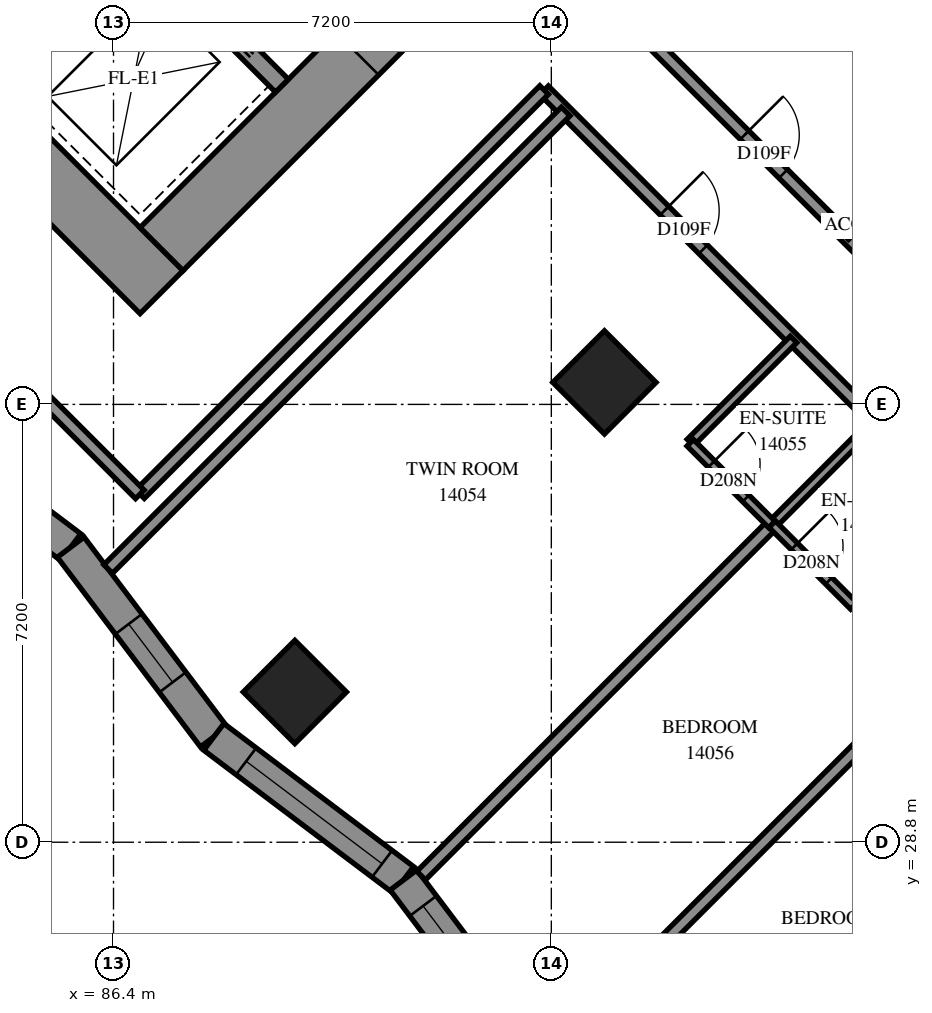
"""IFC4 building model, lengths in metres.
Left out: names, types, materials, properties, quantities, classifications, styles, units other than length and angle.
Written with IfcOpenShell. Run it as: python <this file> out.ifc"""

import sys

from ifc_helpers import new_model, si_unit, direction, frame, frame_2d, origin, origin_2d, place, context, subcontext, project, spatial, polyline, rectangle, outline, extrude, element, fill, save


model = new_model("IFC4")
c1 = context("Model", 3, precision=1e-05, world=origin(), true_north=direction((0.0, 1.0)))
c2 = subcontext(c1, "Body", "Model", "MODEL_VIEW")
j1 = project(units=[si_unit("LENGTHUNIT", "METRE"), si_unit("PLANEANGLEUNIT", "RADIAN")], contexts=[c1])
p1 = place(None, origin())
s1 = spatial("IfcSite", under=j1, at=p1, CompositionType="ELEMENT")
p2 = place(p1, origin())
s2 = spatial("IfcBuilding", under=s1, at=p2, CompositionType="ELEMENT")
p3 = place(p2, frame((0.0, 0.0, 54.2)))
s3 = spatial("IfcBuildingStorey", under=s2, at=p3, CompositionType="ELEMENT", Elevation=54.2)
for number, where, z_axis, x_axis in (
    (1, (94.474, 36.362, 0.0), (0.0, 0.0, 1.0), (0.707, -0.707, 0.0)),
    (2, (89.382, 31.271, 0.0), (0.0, 0.0, 1.0), (0.707, -0.707, 0.0)),
):
    element("IfcColumn", number, at=place(p3, frame(where, z_axis=z_axis, x_axis=x_axis)), inside=s3, PredefinedType="COLUMN", context=c2, shape_type="SweptSolid", body=[
        extrude(rectangle(XDim=1.2, YDim=1.2, at=origin_2d()), origin(), (0.0, 0.0, 1.0), 3.1),
    ])
p4 = place(p3, frame((75.594, 49.443, -0.3), z_axis=(0.0, 0.0, 1.0), x_axis=(0.7071037324, -0.70710983, 0.0)))
e3 = element("IfcWall", 3, at=p4, inside=s3, PredefinedType="SHEAR", context=c2, shape_type="SweptSolid", body=[
    extrude(rectangle(XDim=16.4, YDim=1.0, at=frame_2d((8.2, 0.0))), origin(), (0.0, 0.0, 1.0), 2.7),
])
p5 = place(p3, frame((87.19, 38.554, -0.3), z_axis=(0.0, 0.0, 1.0), x_axis=(0.707103309, 0.7071102534, 0.0)))
e4 = element("IfcWall", 4, at=p5, inside=s3, PredefinedType="SHEAR", context=c2, shape_type="SweptSolid", body=[
    extrude(rectangle(XDim=14.4, YDim=1.0, at=frame_2d((7.2, 0.0))), origin(), (0.0, 0.0, 1.0), 2.7),
])
p6 = place(p5, frame((4.55, 0.0, 0.3)))
e5 = element("IfcOpeningElement", 5, at=p6, cuts=e4, PredefinedType="OPENING", context=c2, shape_type="SweptSolid", body=[
    extrude(rectangle(XDim=1.1, YDim=2.1, at=frame_2d((0.55, 1.05))), frame((0.0, 0.51, 0.0), z_axis=(0.0, -1.0, 0.0), x_axis=(1.0, 0.0, 0.0)), (0.0, 0.0, 1.0), 1.02),
])
p7 = place(p5, frame((11.35, 0.0, 0.3)))
e6 = element("IfcOpeningElement", 6, at=p7, cuts=e4, PredefinedType="OPENING", context=c2, shape_type="SweptSolid", body=[
    extrude(rectangle(XDim=1.1, YDim=2.1, at=frame_2d((0.55, 1.05))), frame((0.0, 0.51, 0.0), z_axis=(0.0, -1.0, 0.0), x_axis=(1.0, 0.0, 0.0)), (0.0, 0.0, 1.0), 1.02),
])
p8 = place(p3, frame((84.291, 41.453, 0.0), z_axis=(0.0, 0.0, 1.0), x_axis=(0.7071067812, 0.7071067812, 0.0)))
e7 = element("IfcWall", 7, at=p8, inside=s3, PredefinedType="SOLIDWALL", context=c2, shape_type="SweptSolid", body=[
    extrude(rectangle(XDim=3.3, YDim=0.3, at=frame_2d((1.65, 0.0))), origin(), (0.0, 0.0, 1.0), 3.1),
])
p9 = place(p3, frame((78.988, 51.423, 0.0), z_axis=(0.0, 0.0, 1.0), x_axis=(0.7071067812, -0.7071067812, 0.0)))
e8 = element("IfcWall", 8, at=p9, inside=s3, PredefinedType="SOLIDWALL", context=c2, shape_type="SweptSolid", body=[
    extrude(rectangle(XDim=14.4, YDim=0.3, at=frame_2d((7.2, 0.0))), origin(), (0.0, 0.0, 1.0), 3.1),
])
p10 = place(p9, frame((1.25, 0.0, 0.0)))
e9 = element("IfcOpeningElement", 9, at=p10, cuts=e8, PredefinedType="OPENING", context=c2, shape_type="SweptSolid", body=[
    extrude(rectangle(XDim=1.1, YDim=2.1, at=frame_2d((0.55, 1.05))), frame((0.0, 0.16, 0.0), z_axis=(0.0, -1.0, 0.0), x_axis=(1.0, 0.0, 0.0)), (0.0, 0.0, 1.0), 0.32),
])
p11 = place(p9, frame((4.85, 0.0, 0.0)))
e10 = element("IfcOpeningElement", 10, at=p11, cuts=e8, PredefinedType="OPENING", context=c2, shape_type="SweptSolid", body=[
    extrude(rectangle(XDim=1.1, YDim=2.1, at=frame_2d((0.55, 1.05))), frame((0.0, 0.16, 0.0), z_axis=(0.0, -1.0, 0.0), x_axis=(1.0, 0.0, 0.0)), (0.0, 0.0, 1.0), 0.32),
])
p12 = place(p9, frame((8.45, 0.0, 0.0)))
e11 = element("IfcOpeningElement", 11, at=p12, cuts=e8, PredefinedType="OPENING", context=c2, shape_type="SweptSolid", body=[
    extrude(rectangle(XDim=1.1, YDim=2.1, at=frame_2d((0.55, 1.05))), frame((0.0, 0.16, 0.0), z_axis=(0.0, -1.0, 0.0), x_axis=(1.0, 0.0, 0.0)), (0.0, 0.0, 1.0), 0.32),
])
p13 = place(p9, frame((12.05, 0.0, 0.0)))
e12 = element("IfcOpeningElement", 12, at=p13, cuts=e8, PredefinedType="OPENING", context=c2, shape_type="SweptSolid", body=[
    extrude(rectangle(XDim=1.1, YDim=2.1, at=frame_2d((0.55, 1.05))), frame((0.0, 0.16, 0.0), z_axis=(0.0, -1.0, 0.0), x_axis=(1.0, 0.0, 0.0)), (0.0, 0.0, 1.0), 0.32),
])
p14 = place(p3, frame((82.577, 36.005, 0.0), z_axis=(0.0, 0.0, 1.0), x_axis=(0.7983449017, -0.6022004799, 0.0)))
e13 = element("IfcWall", 13, at=p14, inside=s3, PredefinedType="SOLIDWALL", context=c2, shape_type="SweptSolid", body=[
    extrude(outline(polyline([(-0.038, -0.275), (3.869, -0.275), (3.946, 0.275), (0.038, 0.275), (-0.038, -0.275)])), origin(), (0.0, 0.0, 1.0), 3.1),
])
p15 = place(p14, frame((1.739, 0.0, 0.5)))
e14 = element("IfcOpeningElement", 14, at=p15, cuts=e13, PredefinedType="OPENING", context=c2, shape_type="SweptSolid", body=[
    extrude(rectangle(XDim=1.2, YDim=2.45, at=frame_2d((0.6, 1.225))), frame((0.0, 0.285, 0.0), z_axis=(0.0, -1.0, 0.0), x_axis=(1.0, 0.0, 0.0)), (0.0, 0.0, 1.0), 0.57),
])
p16 = place(p3, frame((85.696, 33.652, 0.0), z_axis=(0.0, 0.0, 1.0), x_axis=(0.6021964726, -0.7983479244, 0.0)))
e15 = element("IfcWall", 15, at=p16, inside=s3, PredefinedType="SOLIDWALL", context=c2, shape_type="SweptSolid", body=[
    extrude(outline(polyline([(0.038, -0.275), (3.946, -0.275), (3.869, 0.275), (-0.038, 0.275), (0.038, -0.275)])), origin(), (0.0, 0.0, 1.0), 3.1),
])
p17 = place(p16, frame((1.583, 0.0, 0.5)))
e16 = element("IfcOpeningElement", 16, at=p17, cuts=e15, PredefinedType="OPENING", context=c2, shape_type="SweptSolid", body=[
    extrude(rectangle(XDim=1.2, YDim=2.45, at=frame_2d((0.6, 1.225))), frame((0.0, 0.285, 0.0), z_axis=(0.0, -1.0, 0.0), x_axis=(1.0, 0.0, 0.0)), (0.0, 0.0, 1.0), 0.57),
])
p18 = place(p3, frame((88.05, 30.532, 0.0), z_axis=(0.0, 0.0, 1.0), x_axis=(0.7983449017, -0.6022004799, 0.0)))
e17 = element("IfcWall", 17, at=p18, inside=s3, PredefinedType="SOLIDWALL", context=c2, shape_type="SweptSolid", body=[
    extrude(outline(polyline([(-0.038, -0.275), (3.869, -0.275), (3.946, 0.275), (0.038, 0.275), (-0.038, -0.275)])), origin(), (0.0, 0.0, 1.0), 3.1),
])
p19 = place(p18, frame((0.666, 0.0, 0.5)))
e18 = element("IfcOpeningElement", 18, at=p19, cuts=e17, PredefinedType="OPENING", context=c2, shape_type="SweptSolid", body=[
    extrude(rectangle(XDim=2.8, YDim=2.45, at=frame_2d((1.4, 1.225))), frame((0.0, 0.285, 0.0), z_axis=(0.0, -1.0, 0.0), x_axis=(1.0, 0.0, 0.0)), (0.0, 0.0, 1.0), 0.57),
])
p20 = place(p3, frame((91.169, 28.179, 0.0), z_axis=(0.0, 0.0, 1.0), x_axis=(0.6022004799, -0.7983449017, 0.0)))
e19 = element("IfcWall", 19, at=p20, inside=s3, PredefinedType="SOLIDWALL", context=c2, shape_type="SweptSolid", body=[
    extrude(outline(polyline([(0.038, -0.275), (3.946, -0.275), (3.869, 0.275), (-0.038, 0.275), (0.038, -0.275)])), origin(), (0.0, 0.0, 1.0), 3.1),
])
p21 = place(p20, frame((0.535, 0.0, 0.5)))
e20 = element("IfcOpeningElement", 20, at=p21, cuts=e19, PredefinedType="OPENING", context=c2, shape_type="SweptSolid", body=[
    extrude(rectangle(XDim=2.8, YDim=2.45, at=frame_2d((1.4, 1.225))), frame((0.0, 0.285, 0.0), z_axis=(0.0, -1.0, 0.0), x_axis=(1.0, 0.0, 0.0)), (0.0, 0.0, 1.0), 0.57),
])
p22 = place(p3, frame((93.481, 41.167, 0.0), z_axis=(0.0, 0.0, 1.0), x_axis=(0.7071067812, -0.7071067812, 0.0)))
e21 = element("IfcWall", 21, at=p22, inside=s3, PredefinedType="PARTITIONING", context=c2, shape_type="SweptSolid", body=[
    extrude(rectangle(XDim=25.699, YDim=0.2, at=frame_2d((12.85, 0.0))), origin(), (0.0, 0.0, 1.0), 3.1),
])
p23 = place(p22, frame((2.8, 0.0, 0.0)))
e22 = element("IfcOpeningElement", 22, at=p23, cuts=e21, PredefinedType="OPENING", context=c2, shape_type="SweptSolid", body=[
    extrude(rectangle(XDim=0.9, YDim=2.1, at=frame_2d((0.45, 1.05))), frame((0.0, 0.11, 0.0), z_axis=(0.0, -1.0, 0.0), x_axis=(1.0, 0.0, 0.0)), (0.0, 0.0, 1.0), 0.22),
])
p24 = place(p22, frame((9.948, 0.0, 0.0)))
e23 = element("IfcOpeningElement", 23, at=p24, cuts=e21, PredefinedType="OPENING", context=c2, shape_type="SweptSolid", body=[
    extrude(rectangle(XDim=0.9, YDim=2.1, at=frame_2d((0.45, 1.05))), frame((0.0, 0.11, 0.0), z_axis=(0.0, -1.0, 0.0), x_axis=(1.0, 0.0, 0.0)), (0.0, 0.0, 1.0), 0.22),
])
p25 = place(p22, frame((11.7, 0.0, 0.0)))
e24 = element("IfcOpeningElement", 24, at=p25, cuts=e21, PredefinedType="OPENING", context=c2, shape_type="SweptSolid", body=[
    extrude(rectangle(XDim=0.9, YDim=2.1, at=frame_2d((0.45, 1.05))), frame((0.0, 0.11, 0.0), z_axis=(0.0, -1.0, 0.0), x_axis=(1.0, 0.0, 0.0)), (0.0, 0.0, 1.0), 0.22),
])
p26 = place(p22, frame((17.25, 0.0, 0.0)))
e25 = element("IfcOpeningElement", 25, at=p26, cuts=e21, PredefinedType="OPENING", context=c2, shape_type="SweptSolid", body=[
    extrude(rectangle(XDim=0.9, YDim=2.1, at=frame_2d((0.45, 1.05))), frame((0.0, 0.11, 0.0), z_axis=(0.0, -1.0, 0.0), x_axis=(1.0, 0.0, 0.0)), (0.0, 0.0, 1.0), 0.22),
])
p27 = place(p22, frame((22.82, 0.0, 0.0)))
e26 = element("IfcOpeningElement", 26, at=p27, cuts=e21, PredefinedType="OPENING", context=c2, shape_type="SweptSolid", body=[
    extrude(rectangle(XDim=0.9, YDim=2.1, at=frame_2d((0.45, 1.05))), frame((0.0, 0.11, 0.0), z_axis=(0.0, -1.0, 0.0), x_axis=(1.0, 0.0, 0.0)), (0.0, 0.0, 1.0), 0.22),
])
p28 = place(p3, frame((86.312, 33.293, 0.0), z_axis=(0.0, 0.0, 1.0), x_axis=(0.7071067812, 0.7071067812, 0.0)))
e27 = element("IfcWall", 27, at=p28, inside=s3, PredefinedType="PARTITIONING", context=c2, shape_type="SweptSolid", body=[
    extrude(rectangle(XDim=10.641, YDim=0.2, at=frame_2d((5.321, 0.0))), origin(), (0.0, 0.0, 1.0), 3.1),
])
p29 = place(p3, frame((94.761, 42.446, 0.0), z_axis=(0.0, 0.0, 1.0), x_axis=(0.7071067812, -0.7071067812, 0.0)))
e28 = element("IfcWall", 28, at=p29, inside=s3, PredefinedType="PARTITIONING", context=c2, shape_type="SweptSolid", body=[
    extrude(rectangle(XDim=9.597, YDim=0.2, at=frame_2d((4.798, 0.0))), origin(), (0.0, 0.0, 1.0), 3.1),
])
p30 = place(p29, frame((2.851, 0.0, 0.0)))
e29 = element("IfcOpeningElement", 29, at=p30, cuts=e28, PredefinedType="OPENING", context=c2, shape_type="SweptSolid", body=[
    extrude(rectangle(XDim=0.9, YDim=2.1, at=frame_2d((0.45, 1.05))), frame((0.0, 0.11, 0.0), z_axis=(0.0, -1.0, 0.0), x_axis=(1.0, 0.0, 0.0)), (0.0, 0.0, 1.0), 0.22),
])
p31 = place(p3, frame((86.836, 34.524, 0.0), z_axis=(0.0, 0.0, 1.0), x_axis=(0.7071067812, 0.7071067812, 0.0)))
e30 = element("IfcWall", 30, at=p31, inside=s3, PredefinedType="PARTITIONING", context=c2, shape_type="SweptSolid", body=[
    extrude(rectangle(XDim=9.399, YDim=0.2, at=frame_2d((4.699, 0.0))), origin(), (0.0, 0.0, 1.0), 3.1),
])
p32 = place(p3, frame((96.524, 23.14, 0.0), z_axis=(0.0, 0.0, 1.0), x_axis=(0.7071128779, 0.7071006844, 0.0)))
e31 = element("IfcWall", 31, at=p32, inside=s3, PredefinedType="PARTITIONING", context=c2, shape_type="SweptSolid", body=[
    extrude(rectangle(XDim=8.201, YDim=0.2, at=frame_2d((4.101, 0.0))), origin(), (0.0, 0.0, 1.0), 3.1),
])
p33 = place(p3, frame((91.459, 28.251, 0.0), z_axis=(0.0, 0.0, 1.0), x_axis=(0.7072292218, 0.7069843194, 0.0)))
e32 = element("IfcWall", 32, at=p33, inside=s3, PredefinedType="PARTITIONING", context=c2, shape_type="SweptSolid", body=[
    extrude(rectangle(XDim=8.166, YDim=0.2, at=frame_2d((4.083, 0.0))), origin(), (0.0, 0.0, 1.0), 3.1),
])
p34 = place(p3, frame((95.073, 26.781, 0.0), z_axis=(0.0, 0.0, 1.0), x_axis=(0.7071067812, 0.7071067812, 0.0)))
e33 = element("IfcWall", 33, at=p34, inside=s3, PredefinedType="PARTITIONING", context=c2, shape_type="SweptSolid", body=[
    extrude(rectangle(XDim=5.501, YDim=0.2, at=frame_2d((2.751, 0.0))), origin(), (0.0, 0.0, 1.0), 3.1),
])
p35 = place(p3, frame((84.889, 36.465, 0.0), z_axis=(0.0, 0.0, 1.0), x_axis=(0.7071067812, -0.7071067812, 0.0)))
e34 = element("IfcWall", 34, at=p35, inside=s3, PredefinedType="PARTITIONING", context=c2, shape_type="SweptSolid", body=[
    extrude(rectangle(XDim=2.749, YDim=0.2, at=frame_2d((1.375, 0.0))), origin(), (0.0, 0.0, 1.0), 3.1),
])
p36 = place(p3, frame((98.573, 32.685, 0.0), z_axis=(0.0, 0.0, 1.0), x_axis=(0.7071067812, 0.7071067812, 0.0)))
e35 = element("IfcWall", 35, at=p36, inside=s3, PredefinedType="PARTITIONING", context=c2, shape_type="SweptSolid", body=[
    extrude(rectangle(XDim=2.401, YDim=0.15, at=frame_2d((1.201, 0.0))), origin(), (0.0, 0.0, 1.0), 3.1),
])
for number, where, z_axis, x_axis in (
    (36, (97.234, 34.026, 0.0), (0.0, 0.0, 1.0), (0.707, 0.708, 0.0)),
    (37, (98.435, 38.765, 0.0), (0.0, 0.0, 1.0), (0.707, 0.708, 0.0)),
):
    element("IfcWall", number, at=place(p3, frame(where, z_axis=z_axis, x_axis=x_axis)), inside=s3, PredefinedType="PARTITIONING", context=c2, shape_type="SweptSolid", body=[
        extrude(rectangle(XDim=2.4, YDim=0.15, at=frame_2d((1.2, 0.0))), origin(), (0.0, 0.0, 1.0), 3.1),
    ])
p37 = place(p3, frame((95.887, 35.373, 0.0), z_axis=(0.0, 0.0, 1.0), x_axis=(0.7071067812, 0.7071067812, 0.0)))
e38 = element("IfcWall", 38, at=p37, inside=s3, PredefinedType="PARTITIONING", context=c2, shape_type="SweptSolid", body=[
    extrude(rectangle(XDim=2.398, YDim=0.15, at=frame_2d((1.199, 0.0))), origin(), (0.0, 0.0, 1.0), 3.1),
])
p38 = place(p3, frame((95.885, 35.369, 0.0), z_axis=(0.0, 0.0, 1.0), x_axis=(0.7071067812, -0.7071067812, 0.0)))
e39 = element("IfcWall", 39, at=p38, inside=s3, PredefinedType="PARTITIONING", context=c2, shape_type="SweptSolid", body=[
    extrude(rectangle(XDim=1.901, YDim=0.15, at=frame_2d((0.95, 0.0))), origin(), (0.0, 0.0, 1.0), 3.1),
])
p39 = place(p38, frame((0.493, 0.0, 0.0)))
e40 = element("IfcOpeningElement", 40, at=p39, cuts=e39, PredefinedType="OPENING", context=c2, shape_type="SweptSolid", body=[
    extrude(rectangle(XDim=0.8, YDim=2.1, at=frame_2d((0.4, 1.05))), frame((0.0, 0.085, 0.0), z_axis=(0.0, -1.0, 0.0), x_axis=(1.0, 0.0, 0.0)), (0.0, 0.0, 1.0), 0.17),
])
p40 = place(p3, frame((97.233, 34.029, 0.0), z_axis=(0.0, 0.0, 1.0), x_axis=(0.7065800724, -0.7076330979, 0.0)))
e41 = element("IfcWall", 41, at=p40, inside=s3, PredefinedType="PARTITIONING", context=c2, shape_type="SweptSolid", body=[
    extrude(rectangle(XDim=1.899, YDim=0.15, at=frame_2d((0.95, 0.0))), origin(), (0.0, 0.0, 1.0), 3.1),
])
p41 = place(p40, frame((0.515, 0.0, 0.0)))
e42 = element("IfcOpeningElement", 42, at=p41, cuts=e41, PredefinedType="OPENING", context=c2, shape_type="SweptSolid", body=[
    extrude(rectangle(XDim=0.8, YDim=2.1, at=frame_2d((0.4, 1.05))), frame((0.0, 0.085, 0.0), z_axis=(0.0, -1.0, 0.0), x_axis=(1.0, 0.0, 0.0)), (0.0, 0.0, 1.0), 0.17),
])
p42 = place(p17, origin())
e43 = element("IfcWindow", 43, at=p42, inside=s3, PartitioningType="SINGLE_PANEL", PredefinedType="WINDOW", context=c2, shape_type="SweptSolid", body=[
    extrude(rectangle(XDim=1.2, YDim=2.45, at=frame_2d((0.6, 1.225))), frame((0.0, 0.155, 0.0), z_axis=(0.0, -1.0, 0.0), x_axis=(1.0, 0.0, 0.0)), (0.0, 0.0, 1.0), 0.06),
])
fill(e16, e43)
p43 = place(p19, origin())
e44 = element("IfcWindow", 44, at=p43, inside=s3, PartitioningType="SINGLE_PANEL", PredefinedType="WINDOW", context=c2, shape_type="SweptSolid", body=[
    extrude(rectangle(XDim=2.8, YDim=2.45, at=frame_2d((1.4, 1.225))), frame((0.0, 0.155, 0.0), z_axis=(0.0, -1.0, 0.0), x_axis=(1.0, 0.0, 0.0)), (0.0, 0.0, 1.0), 0.06),
])
fill(e18, e44)
p44 = place(p21, origin())
e45 = element("IfcWindow", 45, at=p44, inside=s3, PartitioningType="SINGLE_PANEL", PredefinedType="WINDOW", context=c2, shape_type="SweptSolid", body=[
    extrude(rectangle(XDim=2.8, YDim=2.45, at=frame_2d((1.4, 1.225))), frame((0.0, 0.155, 0.0), z_axis=(0.0, -1.0, 0.0), x_axis=(1.0, 0.0, 0.0)), (0.0, 0.0, 1.0), 0.06),
])
fill(e20, e45)
p45 = place(p6, origin())
e46 = element("IfcDoor", 46, at=p45, inside=s3, OperationType="DOUBLE_DOOR_SINGLE_SWING", PredefinedType="DOOR", context=c2, shape_type="SweptSolid", body=[
    extrude(rectangle(XDim=1.1, YDim=2.1, at=frame_2d((0.55, 1.05))), frame((0.0, 0.025, 0.0), z_axis=(0.0, -1.0, 0.0), x_axis=(1.0, 0.0, 0.0)), (0.0, 0.0, 1.0), 0.05),
])
fill(e5, e46)
p46 = place(p30, origin())
e47 = element("IfcDoor", 47, at=p46, inside=s3, OperationType="SINGLE_SWING_RIGHT", PredefinedType="DOOR", context=c2, shape_type="SweptSolid", body=[
    extrude(rectangle(XDim=0.9, YDim=2.1, at=frame_2d((0.45, 1.05))), frame((0.0, 0.025, 0.0), z_axis=(0.0, -1.0, 0.0), x_axis=(1.0, 0.0, 0.0)), (0.0, 0.0, 1.0), 0.05),
])
fill(e29, e47)
p47 = place(p23, origin())
e48 = element("IfcDoor", 48, at=p47, inside=s3, OperationType="SINGLE_SWING_LEFT", PredefinedType="DOOR", context=c2, shape_type="SweptSolid", body=[
    extrude(rectangle(XDim=0.9, YDim=2.1, at=frame_2d((0.45, 1.05))), frame((0.0, 0.025, 0.0), z_axis=(0.0, -1.0, 0.0), x_axis=(1.0, 0.0, 0.0)), (0.0, 0.0, 1.0), 0.05),
])
fill(e22, e48)
p48 = place(p39, origin())
e49 = element("IfcDoor", 49, at=p48, inside=s3, OperationType="SINGLE_SWING_RIGHT", PredefinedType="DOOR", context=c2, shape_type="SweptSolid", body=[
    extrude(rectangle(XDim=0.8, YDim=2.1, at=frame_2d((0.4, 1.05))), frame((0.0, 0.025, 0.0), z_axis=(0.0, -1.0, 0.0), x_axis=(1.0, 0.0, 0.0)), (0.0, 0.0, 1.0), 0.05),
])
fill(e40, e49)
p49 = place(p41, origin())
e50 = element("IfcDoor", 50, at=p49, inside=s3, OperationType="SINGLE_SWING_RIGHT", PredefinedType="DOOR", context=c2, shape_type="SweptSolid", body=[
    extrude(rectangle(XDim=0.8, YDim=2.1, at=frame_2d((0.4, 1.05))), frame((0.0, 0.025, 0.0), z_axis=(0.0, -1.0, 0.0), x_axis=(1.0, 0.0, 0.0)), (0.0, 0.0, 1.0), 0.05),
])
fill(e42, e50)
save(model, sys.argv[1])
